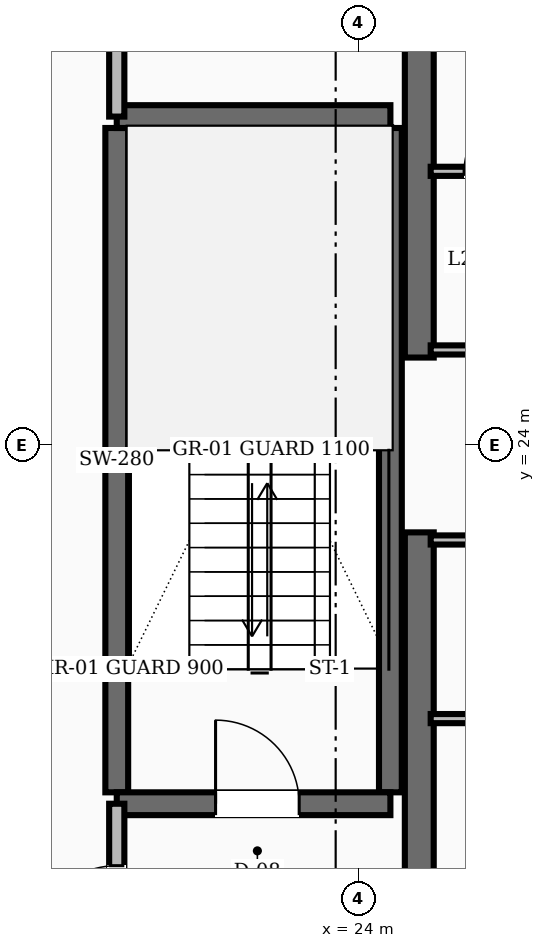
"""IFC4 building model, lengths in metres.
Left out: names, types, materials, properties, quantities, classifications, styles, units other than length and angle.
Written with IfcOpenShell. Run it as: python <this file> out.ifc"""

import sys

from ifc_helpers import new_model, si_unit, direction, frame, frame_2d, origin, place, context, subcontext, project, spatial, rectangle, extrude, element, fill, save


model = new_model("IFC4")
c1 = context("Model", 3, precision=1e-05, world=origin(), true_north=direction((0.0, 1.0)))
c2 = subcontext(c1, "Body", "Model", "MODEL_VIEW")
j1 = project(units=[si_unit("LENGTHUNIT", "METRE"), si_unit("PLANEANGLEUNIT", "RADIAN")], contexts=[c1])
p1 = place(None, origin())
s1 = spatial("IfcSite", under=j1, at=p1, CompositionType="ELEMENT")
p2 = place(p1, origin())
s2 = spatial("IfcBuilding", under=s1, at=p2, CompositionType="ELEMENT")
p3 = place(p2, frame((0.0, 0.0, 91.6)))
s3 = spatial("IfcBuildingStorey", under=s2, at=p3, CompositionType="ELEMENT", Elevation=91.6)
for number, where, z_axis, x_axis in (
    (1, (24.8, 16.55, 0.0), (0.0, 0.0, 1.0), (0.0, 1.0, 0.0)),
    (2, (24.8, 25.15, 0.0), (0.0, 0.0, 1.0), (0.0, 1.0, 0.0)),
):
    element("IfcWall", number, at=place(p3, frame(where, z_axis=z_axis, x_axis=x_axis)), inside=s3, PredefinedType="SHEAR", context=c2, shape_type="SweptSolid", body=[
        extrude(rectangle(XDim=6.3, YDim=0.38, at=frame_2d((3.15, 0.0))), origin(), (0.0, 0.0, 1.0), 3.6),
    ])
for number, where, z_axis, x_axis in (
    (3, (20.82, 19.43, 0.0), (0.0, 0.0, 1.0), (0.0, 1.0, 0.0)),
    (4, (24.42, 19.43, 0.0), (0.0, 0.0, 1.0), (0.0, 1.0, 0.0)),
):
    element("IfcWall", number, at=place(p3, frame(where, z_axis=z_axis, x_axis=x_axis)), inside=s3, PredefinedType="SHEAR", context=c2, shape_type="SweptSolid", body=[
        extrude(rectangle(XDim=8.74, YDim=0.3, at=frame_2d((4.37, 0.0))), origin(), (0.0, 0.0, 1.0), 3.6),
    ])
p4 = place(p3, frame((20.82, 19.28, 0.0), z_axis=(0.0, 0.0, 1.0), x_axis=(1.0, 0.0, 0.0)))
e5 = element("IfcWall", 5, at=p4, inside=s3, PredefinedType="SHEAR", context=c2, shape_type="SweptSolid", body=[
    extrude(rectangle(XDim=3.6, YDim=0.3, at=frame_2d((1.8, 0.0))), origin(), (0.0, 0.0, 1.0), 3.6),
])
p5 = place(p4, frame((1.3, 0.0, 0.0)))
e6 = element("IfcOpeningElement", 6, at=p5, cuts=e5, PredefinedType="OPENING", context=c2, shape_type="SweptSolid", body=[
    extrude(rectangle(XDim=1.1, YDim=2.1, at=frame_2d((0.55, 1.05))), frame((0.0, 0.16, 0.0), z_axis=(0.0, -1.0, 0.0), x_axis=(1.0, 0.0, 0.0)), (0.0, 0.0, 1.0), 0.32),
])
p6 = place(p3, frame((20.82, 28.32, 0.0), z_axis=(0.0, 0.0, 1.0), x_axis=(1.0, 0.0, 0.0)))
e7 = element("IfcWall", 7, at=p6, inside=s3, PredefinedType="SHEAR", context=c2, shape_type="SweptSolid", body=[
    extrude(rectangle(XDim=3.6, YDim=0.3, at=frame_2d((1.8, 0.0))), origin(), (0.0, 0.0, 1.0), 3.6),
])
p7 = place(p3, frame((20.82, 16.55, 0.0), z_axis=(0.0, 0.0, 1.0), x_axis=(0.0, 1.0, 0.0)))
e8 = element("IfcWall", 8, at=p7, inside=s3, PredefinedType="SOLIDWALL", context=c2, shape_type="SweptSolid", body=[
    extrude(rectangle(XDim=2.73, YDim=0.2, at=frame_2d((1.365, 0.0))), origin(), (0.0, 0.0, 1.0), 2.71),
])
p8 = place(p7, frame((0.815, 0.0, 0.0)))
e9 = element("IfcOpeningElement", 9, at=p8, cuts=e8, PredefinedType="OPENING", context=c2, shape_type="SweptSolid", body=[
    extrude(rectangle(XDim=1.1, YDim=2.1, at=frame_2d((0.55, 1.05))), frame((0.0, 0.11, 0.0), z_axis=(0.0, -1.0, 0.0), x_axis=(1.0, 0.0, 0.0)), (0.0, 0.0, 1.0), 0.22),
])
p9 = place(p3, frame((20.82, 28.32, 0.0), z_axis=(0.0, 0.0, 1.0), x_axis=(0.0, 1.0, 0.0)))
e10 = element("IfcWall", 10, at=p9, inside=s3, PredefinedType="SOLIDWALL", context=c2, shape_type="SweptSolid", body=[
    extrude(rectangle(XDim=3.13, YDim=0.2, at=frame_2d((1.565, 0.0))), origin(), (0.0, 0.0, 1.0), 2.71),
])
p10 = place(p9, frame((1.09, 0.0, 0.0)))
e11 = element("IfcOpeningElement", 11, at=p10, cuts=e10, PredefinedType="OPENING", context=c2, shape_type="SweptSolid", body=[
    extrude(rectangle(XDim=0.95, YDim=2.1, at=frame_2d((0.475, 1.05))), frame((0.0, 0.11, 0.0), z_axis=(0.0, -1.0, 0.0), x_axis=(1.0, 0.0, 0.0)), (0.0, 0.0, 1.0), 0.22),
])
p11 = place(p3, frame((24.95, 25.25, 0.0), z_axis=(0.0, 0.0, 1.0), x_axis=(1.0, 0.0, 0.0)))
e12 = element("IfcWall", 12, at=p11, inside=s3, PredefinedType="PARTITIONING", context=c2, shape_type="SweptSolid", body=[
    extrude(rectangle(XDim=3.2, YDim=0.12, at=frame_2d((1.6, 0.0))), origin(), (0.0, 0.0, 1.0), 2.71),
])
p12 = place(p11, frame((1.125, 0.0, 0.0)))
e13 = element("IfcOpeningElement", 13, at=p12, cuts=e12, PredefinedType="OPENING", context=c2, shape_type="SweptSolid", body=[
    extrude(rectangle(XDim=0.95, YDim=2.1, at=frame_2d((0.475, 1.05))), frame((0.0, 0.07, 0.0), z_axis=(0.0, -1.0, 0.0), x_axis=(1.0, 0.0, 0.0)), (0.0, 0.0, 1.0), 0.14),
])
p13 = place(p3, frame((24.95, 22.75, 0.0), z_axis=(0.0, 0.0, 1.0), x_axis=(1.0, 0.0, 0.0)))
e14 = element("IfcWall", 14, at=p13, inside=s3, PredefinedType="PARTITIONING", context=c2, shape_type="SweptSolid", body=[
    extrude(rectangle(XDim=3.2, YDim=0.12, at=frame_2d((1.6, 0.0))), origin(), (0.0, 0.0, 1.0), 2.71),
])
p14 = place(p13, frame((1.125, 0.0, 0.0)))
e15 = element("IfcOpeningElement", 15, at=p14, cuts=e14, PredefinedType="OPENING", context=c2, shape_type="SweptSolid", body=[
    extrude(rectangle(XDim=0.95, YDim=2.1, at=frame_2d((0.475, 1.05))), frame((0.0, 0.07, 0.0), z_axis=(0.0, -1.0, 0.0), x_axis=(1.0, 0.0, 0.0)), (0.0, 0.0, 1.0), 0.14),
])
p15 = place(p3, frame((24.95, 27.6, 0.0), z_axis=(0.0, 0.0, 1.0), x_axis=(1.0, 0.0, 0.0)))
e16 = element("IfcWall", 16, at=p15, inside=s3, PredefinedType="PARTITIONING", context=c2, shape_type="SweptSolid", body=[
    extrude(rectangle(XDim=3.2, YDim=0.12, at=frame_2d((1.6, 0.0))), origin(), (0.0, 0.0, 1.0), 2.71),
])
p16 = place(p15, frame((0.44, 0.0, 0.0)))
e17 = element("IfcOpeningElement", 17, at=p16, cuts=e16, PredefinedType="OPENING", context=c2, shape_type="SweptSolid", body=[
    extrude(rectangle(XDim=0.86, YDim=2.1, at=frame_2d((0.43, 1.05))), frame((0.0, 0.07, 0.0), z_axis=(0.0, -1.0, 0.0), x_axis=(1.0, 0.0, 0.0)), (0.0, 0.0, 1.0), 0.14),
])
p17 = place(p15, frame((1.9, 0.0, 0.0)))
e18 = element("IfcOpeningElement", 18, at=p17, cuts=e16, PredefinedType="OPENING", context=c2, shape_type="SweptSolid", body=[
    extrude(rectangle(XDim=0.86, YDim=2.1, at=frame_2d((0.43, 1.05))), frame((0.0, 0.07, 0.0), z_axis=(0.0, -1.0, 0.0), x_axis=(1.0, 0.0, 0.0)), (0.0, 0.0, 1.0), 0.14),
])
p18 = place(p3, frame((24.95, 20.4, 0.0), z_axis=(0.0, 0.0, 1.0), x_axis=(1.0, 0.0, 0.0)))
e19 = element("IfcWall", 19, at=p18, inside=s3, PredefinedType="PARTITIONING", context=c2, shape_type="SweptSolid", body=[
    extrude(rectangle(XDim=3.2, YDim=0.12, at=frame_2d((1.6, 0.0))), origin(), (0.0, 0.0, 1.0), 2.71),
])
p19 = place(p18, frame((1.125, 0.0, 0.0)))
e20 = element("IfcOpeningElement", 20, at=p19, cuts=e19, PredefinedType="OPENING", context=c2, shape_type="SweptSolid", body=[
    extrude(rectangle(XDim=0.95, YDim=2.1, at=frame_2d((0.475, 1.05))), frame((0.0, 0.07, 0.0), z_axis=(0.0, -1.0, 0.0), x_axis=(1.0, 0.0, 0.0)), (0.0, 0.0, 1.0), 0.14),
])
p20 = place(p5, origin())
e21 = element("IfcDoor", 21, at=p20, inside=s3, OperationType="SINGLE_SWING_LEFT", PredefinedType="DOOR", context=c2, shape_type="SweptSolid", body=[
    extrude(rectangle(XDim=1.1, YDim=2.1, at=frame_2d((0.55, 1.05))), frame((0.0, 0.025, 0.0), z_axis=(0.0, -1.0, 0.0), x_axis=(1.0, 0.0, 0.0)), (0.0, 0.0, 1.0), 0.05),
])
fill(e6, e21)
p21 = place(p8, origin())
e22 = element("IfcDoor", 22, at=p21, inside=s3, OperationType="SINGLE_SWING_LEFT", PredefinedType="DOOR", context=c2, shape_type="SweptSolid", body=[
    extrude(rectangle(XDim=1.1, YDim=2.1, at=frame_2d((0.55, 1.05))), frame((0.0, 0.025, 0.0), z_axis=(0.0, -1.0, 0.0), x_axis=(1.0, 0.0, 0.0)), (0.0, 0.0, 1.0), 0.05),
])
fill(e9, e22)
p22 = place(p16, origin())
e23 = element("IfcDoor", 23, at=p22, inside=s3, OperationType="SINGLE_SWING_RIGHT", PredefinedType="DOOR", context=c2, shape_type="SweptSolid", body=[
    extrude(rectangle(XDim=0.86, YDim=2.1, at=frame_2d((0.43, 1.05))), frame((0.0, 0.025, 0.0), z_axis=(0.0, -1.0, 0.0), x_axis=(1.0, 0.0, 0.0)), (0.0, 0.0, 1.0), 0.05),
])
fill(e17, e23)
save(model, sys.argv[1])
